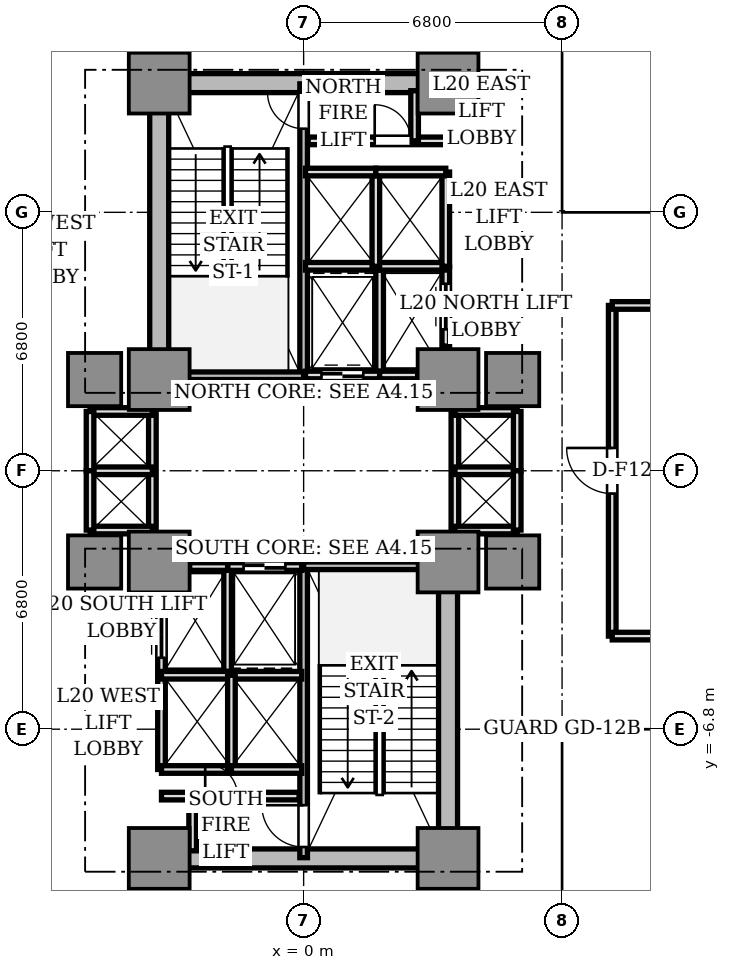
"""IFC4 building model, lengths in metres.
Left out: names, types, materials, properties, quantities, classifications, styles, units other than length and angle.
Written with IfcOpenShell. Run it as: python <this file> out.ifc"""

import sys

from ifc_helpers import new_model, si_unit, direction, frame, frame_2d, origin, origin_2d, place, context, subcontext, project, spatial, rectangle, extrude, source, transform, mapped, element, fill, save


model = new_model("IFC4")
c1 = context("Model", 3, precision=1e-05, world=origin(), true_north=direction((0.0, 1.0)))
c2 = subcontext(c1, "Body", "Model", "MODEL_VIEW")
j1 = project(units=[si_unit("LENGTHUNIT", "METRE"), si_unit("PLANEANGLEUNIT", "RADIAN")], contexts=[c1])
p1 = place(None, origin())
s1 = spatial("IfcSite", under=j1, at=p1, CompositionType="ELEMENT")
p2 = place(p1, origin())
s2 = spatial("IfcBuilding", under=s1, at=p2, CompositionType="ELEMENT")
p3 = place(p2, frame((0.0, 0.0, 74.5)))
s3 = spatial("IfcBuildingStorey", under=s2, at=p3, CompositionType="ELEMENT", Elevation=74.5)
p4 = place(p3, frame((-3.55, 10.2, 0.0), z_axis=(0.0, 0.0, 1.0), x_axis=(1.0, 0.0, 0.0)))
e1 = element("IfcWall", 1, at=p4, inside=s3, PredefinedType="SHEAR", context=c2, shape_type="SweptSolid", body=[
    extrude(rectangle(XDim=7.1, YDim=0.5, at=frame_2d((3.55, 0.0))), origin(), (0.0, 0.0, 1.0), 4.18),
])
p5 = place(p3, frame((-3.8, 2.85, 0.0), z_axis=(0.0, 0.0, 1.0), x_axis=(0.0, 1.0, 0.0)))
e2 = element("IfcWall", 2, at=p5, inside=s3, PredefinedType="SHEAR", context=c2, shape_type="SweptSolid", body=[
    extrude(rectangle(XDim=6.9, YDim=0.5, at=frame_2d((3.45, 0.0))), origin(), (0.0, 0.0, 1.0), 4.18),
])
p6 = place(p3, frame((-3.55, -10.2, 0.0), z_axis=(0.0, 0.0, 1.0), x_axis=(1.0, 0.0, 0.0)))
e3 = element("IfcWall", 3, at=p6, inside=s3, PredefinedType="SHEAR", context=c2, shape_type="SweptSolid", body=[
    extrude(rectangle(XDim=7.1, YDim=0.5, at=frame_2d((3.55, 0.0))), origin(), (0.0, 0.0, 1.0), 4.18),
])
p7 = place(p3, frame((3.8, -9.75, 0.0), z_axis=(0.0, 0.0, 1.0), x_axis=(0.0, 1.0, 0.0)))
e4 = element("IfcWall", 4, at=p7, inside=s3, PredefinedType="SHEAR", context=c2, shape_type="SweptSolid", body=[
    extrude(rectangle(XDim=6.9, YDim=0.5, at=frame_2d((3.45, 0.0))), origin(), (0.0, 0.0, 1.0), 4.18),
])
m1 = source(origin(), c2, "Body", "SweptSolid", [
    extrude(rectangle(XDim=1.6, YDim=1.6, at=origin_2d()), origin(), (0.0, 0.0, 1.0), 4.18),
])
for number, where, z_axis, x_axis in (
    (5, (-3.8, 2.4, 0.0), (0.0, 0.0, 1.0), (1.0, 0.0, 0.0)),
    (6, (3.8, 2.4, 0.0), (0.0, 0.0, 1.0), (1.0, 0.0, 0.0)),
    (7, (-3.8, 10.2, 0.0), (0.0, 0.0, 1.0), (1.0, 0.0, 0.0)),
    (8, (3.8, 10.2, 0.0), (0.0, 0.0, 1.0), (1.0, 0.0, 0.0)),
    (9, (-3.8, -2.4, 0.0), (0.0, 0.0, 1.0), (1.0, 0.0, 0.0)),
    (10, (3.8, -2.4, 0.0), (0.0, 0.0, 1.0), (1.0, 0.0, 0.0)),
    (11, (-3.8, -10.2, 0.0), (0.0, 0.0, 1.0), (1.0, 0.0, 0.0)),
    (12, (3.8, -10.2, 0.0), (0.0, 0.0, 1.0), (1.0, 0.0, 0.0)),
):
    element("IfcColumn", number, at=place(p3, frame(where, z_axis=z_axis, x_axis=x_axis)), inside=s3, PredefinedType="COLUMN", context=c2, shape_type="MappedRepresentation", body=[
        mapped(m1, transform((0.0, 0.0, 0.0), scale=1.0)),
    ])
m2 = source(origin(), c2, "Body", "SweptSolid", [
    extrude(rectangle(XDim=1.4, YDim=1.4, at=origin_2d()), origin(), (0.0, 0.0, 1.0), 4.18),
])
for number, where, z_axis, x_axis in (
    (13, (5.5, 2.4, 0.0), (0.0, 0.0, 1.0), (1.0, 0.0, 0.0)),
    (14, (-5.5, 2.4, 0.0), (0.0, 0.0, 1.0), (1.0, 0.0, 0.0)),
    (15, (5.5, -2.4, 0.0), (0.0, 0.0, 1.0), (1.0, 0.0, 0.0)),
    (16, (-5.5, -2.4, 0.0), (0.0, 0.0, 1.0), (1.0, 0.0, 0.0)),
):
    element("IfcColumn", number, at=place(p3, frame(where, z_axis=z_axis, x_axis=x_axis)), inside=s3, PredefinedType="COLUMN", context=c2, shape_type="MappedRepresentation", body=[
        mapped(m2, transform((0.0, 0.0, 0.0), scale=1.0)),
    ])
p8 = place(p3, frame((0.0, 2.5, 0.0), z_axis=(0.0, 0.0, 1.0), x_axis=(0.0, 1.0, 0.0)))
e17 = element("IfcWall", 17, at=p8, inside=s3, PredefinedType="SOLIDWALL", context=c2, shape_type="SweptSolid", body=[
    extrude(rectangle(XDim=7.68, YDim=0.2, at=frame_2d((3.84, 0.0))), origin(), (0.0, 0.0, 1.0), 4.18),
])
p9 = place(p8, frame((6.5, 0.0, 0.0)))
e18 = element("IfcOpeningElement", 18, at=p9, cuts=e17, PredefinedType="OPENING", context=c2, shape_type="SweptSolid", body=[
    extrude(rectangle(XDim=0.95, YDim=2.15, at=frame_2d((0.475, 1.075))), frame((0.0, 0.11, 0.0), z_axis=(0.0, -1.0, 0.0), x_axis=(1.0, 0.0, 0.0)), (0.0, 0.0, 1.0), 0.22),
])
p10 = place(p3, frame((-3.72, 2.5, 0.0), z_axis=(0.0, 0.0, 1.0), x_axis=(1.0, 0.0, 0.0)))
e19 = element("IfcWall", 19, at=p10, inside=s3, PredefinedType="SOLIDWALL", context=c2, shape_type="SweptSolid", body=[
    extrude(rectangle(XDim=3.72, YDim=0.2, at=frame_2d((1.86, 0.0))), origin(), (0.0, 0.0, 1.0), 4.18),
])
p11 = place(p3, frame((0.0, -10.18, 0.0), z_axis=(0.0, 0.0, 1.0), x_axis=(0.0, 1.0, 0.0)))
e20 = element("IfcWall", 20, at=p11, inside=s3, PredefinedType="SOLIDWALL", context=c2, shape_type="SweptSolid", body=[
    extrude(rectangle(XDim=7.68, YDim=0.2, at=frame_2d((3.84, 0.0))), origin(), (0.0, 0.0, 1.0), 4.18),
])
p12 = place(p11, frame((0.28, 0.0, 0.0)))
e21 = element("IfcOpeningElement", 21, at=p12, cuts=e20, PredefinedType="OPENING", context=c2, shape_type="SweptSolid", body=[
    extrude(rectangle(XDim=1.1, YDim=2.15, at=frame_2d((0.55, 1.075))), frame((0.0, 0.11, 0.0), z_axis=(0.0, -1.0, 0.0), x_axis=(1.0, 0.0, 0.0)), (0.0, 0.0, 1.0), 0.22),
])
p13 = place(p3, frame((0.0, -2.5, 0.0), z_axis=(0.0, 0.0, 1.0), x_axis=(1.0, 0.0, 0.0)))
e22 = element("IfcWall", 22, at=p13, inside=s3, PredefinedType="SOLIDWALL", context=c2, shape_type="SweptSolid", body=[
    extrude(rectangle(XDim=3.72, YDim=0.2, at=frame_2d((1.86, 0.0))), origin(), (0.0, 0.0, 1.0), 4.18),
])
p14 = place(p3, frame((2.0, 2.5, 0.0), z_axis=(0.0, 0.0, 1.0), x_axis=(0.0, 1.0, 0.0)))
e23 = element("IfcWall", 23, at=p14, inside=s3, PredefinedType="SOLIDWALL", context=c2, shape_type="SweptSolid", body=[
    extrude(rectangle(XDim=2.78, YDim=0.2, at=frame_2d((1.39, 0.0))), origin(), (0.0, 0.0, 1.0), 3.73),
])
p15 = place(p3, frame((0.05, 2.52, 0.0), z_axis=(0.0, 0.0, 1.0), x_axis=(1.0, 0.0, 0.0)))
e24 = element("IfcWall", 24, at=p15, inside=s3, PredefinedType="SOLIDWALL", context=c2, shape_type="SweptSolid", body=[
    extrude(rectangle(XDim=1.95, YDim=0.2, at=frame_2d((0.975, 0.0))), origin(), (0.0, 0.0, 1.0), 3.73),
])
p16 = place(p15, frame((0.42, 0.0, 0.0)))
e25 = element("IfcOpeningElement", 25, at=p16, cuts=e24, PredefinedType="OPENING", context=c2, shape_type="SweptSolid", body=[
    extrude(rectangle(XDim=1.1, YDim=2.2, at=frame_2d((0.55, 1.1))), frame((0.0, 0.11, 0.0), z_axis=(0.0, -1.0, 0.0), x_axis=(1.0, 0.0, 0.0)), (0.0, 0.0, 1.0), 0.22),
])
p17 = place(p3, frame((-2.0, -5.28, 0.0), z_axis=(0.0, 0.0, 1.0), x_axis=(0.0, 1.0, 0.0)))
e26 = element("IfcWall", 26, at=p17, inside=s3, PredefinedType="SOLIDWALL", context=c2, shape_type="SweptSolid", body=[
    extrude(rectangle(XDim=2.78, YDim=0.2, at=frame_2d((1.39, 0.0))), origin(), (0.0, 0.0, 1.0), 3.73),
])
p18 = place(p3, frame((-2.0, -2.52, 0.0), z_axis=(0.0, 0.0, 1.0), x_axis=(1.0, 0.0, 0.0)))
e27 = element("IfcWall", 27, at=p18, inside=s3, PredefinedType="SOLIDWALL", context=c2, shape_type="SweptSolid", body=[
    extrude(rectangle(XDim=1.95, YDim=0.2, at=frame_2d((0.975, 0.0))), origin(), (0.0, 0.0, 1.0), 3.73),
])
p19 = place(p18, frame((0.42, 0.0, 0.0)))
e28 = element("IfcOpeningElement", 28, at=p19, cuts=e27, PredefinedType="OPENING", context=c2, shape_type="SweptSolid", body=[
    extrude(rectangle(XDim=1.1, YDim=2.2, at=frame_2d((0.55, 1.1))), frame((0.0, 0.11, 0.0), z_axis=(0.0, -1.0, 0.0), x_axis=(1.0, 0.0, 0.0)), (0.0, 0.0, 1.0), 0.22),
])
p20 = place(p3, frame((2.0, 2.52, 0.0), z_axis=(0.0, 0.0, 1.0), x_axis=(1.0, 0.0, 0.0)))
e29 = element("IfcWall", 29, at=p20, inside=s3, PredefinedType="SOLIDWALL", context=c2, shape_type="SweptSolid", body=[
    extrude(rectangle(XDim=1.0, YDim=0.2, at=frame_2d((0.5, 0.0))), origin(), (0.0, 0.0, 1.0), 3.73),
])
p21 = place(p3, frame((3.74, 3.28, 0.0), z_axis=(0.0, 0.0, 1.0), x_axis=(0.0, 1.0, 0.0)))
e30 = element("IfcWall", 30, at=p21, inside=s3, PredefinedType="SOLIDWALL", context=c2, shape_type="SweptSolid", body=[
    extrude(rectangle(XDim=2.08, YDim=0.2, at=frame_2d((1.04, 0.0))), origin(), (0.0, 0.0, 1.0), 3.73),
])
p22 = place(p21, frame((0.44, 0.0, 0.0)))
e31 = element("IfcOpeningElement", 31, at=p22, cuts=e30, PredefinedType="OPENING", context=c2, shape_type="SweptSolid", body=[
    extrude(rectangle(XDim=1.2, YDim=2.2, at=frame_2d((0.6, 1.1))), frame((0.0, 0.11, 0.0), z_axis=(0.0, -1.0, 0.0), x_axis=(1.0, 0.0, 0.0)), (0.0, 0.0, 1.0), 0.22),
])
p23 = place(p3, frame((-3.0, -2.52, 0.0), z_axis=(0.0, 0.0, 1.0), x_axis=(1.0, 0.0, 0.0)))
e32 = element("IfcWall", 32, at=p23, inside=s3, PredefinedType="SOLIDWALL", context=c2, shape_type="SweptSolid", body=[
    extrude(rectangle(XDim=1.0, YDim=0.2, at=frame_2d((0.5, 0.0))), origin(), (0.0, 0.0, 1.0), 3.73),
])
p24 = place(p3, frame((-3.74, -5.36, 0.0), z_axis=(0.0, 0.0, 1.0), x_axis=(0.0, 1.0, 0.0)))
e33 = element("IfcWall", 33, at=p24, inside=s3, PredefinedType="SOLIDWALL", context=c2, shape_type="SweptSolid", body=[
    extrude(rectangle(XDim=2.08, YDim=0.2, at=frame_2d((1.04, 0.0))), origin(), (0.0, 0.0, 1.0), 3.73),
])
p25 = place(p24, frame((0.44, 0.0, 0.0)))
e34 = element("IfcOpeningElement", 34, at=p25, cuts=e33, PredefinedType="OPENING", context=c2, shape_type="SweptSolid", body=[
    extrude(rectangle(XDim=1.2, YDim=2.2, at=frame_2d((0.6, 1.1))), frame((0.0, 0.11, 0.0), z_axis=(0.0, -1.0, 0.0), x_axis=(1.0, 0.0, 0.0)), (0.0, 0.0, 1.0), 0.22),
])
p26 = place(p3, frame((0.05, 5.38, 0.0), z_axis=(0.0, 0.0, 1.0), x_axis=(1.0, 0.0, 0.0)))
e35 = element("IfcWall", 35, at=p26, inside=s3, PredefinedType="SOLIDWALL", context=c2, shape_type="SweptSolid", body=[
    extrude(rectangle(XDim=3.69, YDim=0.2, at=frame_2d((1.845, 0.0))), origin(), (0.0, 0.0, 1.0), 3.73),
])
p27 = place(p3, frame((1.9, 5.38, 0.0), z_axis=(0.0, 0.0, 1.0), x_axis=(0.0, 1.0, 0.0)))
e36 = element("IfcWall", 36, at=p27, inside=s3, PredefinedType="SOLIDWALL", context=c2, shape_type="SweptSolid", body=[
    extrude(rectangle(XDim=2.48, YDim=0.2, at=frame_2d((1.24, 0.0))), origin(), (0.0, 0.0, 1.0), 3.73),
])
p28 = place(p3, frame((0.05, 7.86, 0.0), z_axis=(0.0, 0.0, 1.0), x_axis=(1.0, 0.0, 0.0)))
e37 = element("IfcWall", 37, at=p28, inside=s3, PredefinedType="SOLIDWALL", context=c2, shape_type="SweptSolid", body=[
    extrude(rectangle(XDim=1.85, YDim=0.2, at=frame_2d((0.925, 0.0))), origin(), (0.0, 0.0, 1.0), 3.73),
])
p29 = place(p3, frame((3.74, 5.38, 0.0), z_axis=(0.0, 0.0, 1.0), x_axis=(0.0, 1.0, 0.0)))
e38 = element("IfcWall", 38, at=p29, inside=s3, PredefinedType="SOLIDWALL", context=c2, shape_type="SweptSolid", body=[
    extrude(rectangle(XDim=2.48, YDim=0.2, at=frame_2d((1.24, 0.0))), origin(), (0.0, 0.0, 1.0), 3.73),
])
p30 = place(p3, frame((1.9, 7.86, 0.0), z_axis=(0.0, 0.0, 1.0), x_axis=(1.0, 0.0, 0.0)))
e39 = element("IfcWall", 39, at=p30, inside=s3, PredefinedType="SOLIDWALL", context=c2, shape_type="SweptSolid", body=[
    extrude(rectangle(XDim=1.84, YDim=0.2, at=frame_2d((0.92, 0.0))), origin(), (0.0, 0.0, 1.0), 3.73),
])
p31 = place(p3, frame((-3.74, -7.86, 0.0), z_axis=(0.0, 0.0, 1.0), x_axis=(0.0, 1.0, 0.0)))
e40 = element("IfcWall", 40, at=p31, inside=s3, PredefinedType="SOLIDWALL", context=c2, shape_type="SweptSolid", body=[
    extrude(rectangle(XDim=2.48, YDim=0.2, at=frame_2d((1.24, 0.0))), origin(), (0.0, 0.0, 1.0), 3.73),
])
p32 = place(p3, frame((-3.74, -7.86, 0.0), z_axis=(0.0, 0.0, 1.0), x_axis=(1.0, 0.0, 0.0)))
e41 = element("IfcWall", 41, at=p32, inside=s3, PredefinedType="SOLIDWALL", context=c2, shape_type="SweptSolid", body=[
    extrude(rectangle(XDim=1.84, YDim=0.2, at=frame_2d((0.92, 0.0))), origin(), (0.0, 0.0, 1.0), 3.73),
])
p33 = place(p3, frame((-3.74, -5.38, 0.0), z_axis=(0.0, 0.0, 1.0), x_axis=(1.0, 0.0, 0.0)))
e42 = element("IfcWall", 42, at=p33, inside=s3, PredefinedType="SOLIDWALL", context=c2, shape_type="SweptSolid", body=[
    extrude(rectangle(XDim=3.69, YDim=0.2, at=frame_2d((1.845, 0.0))), origin(), (0.0, 0.0, 1.0), 3.73),
])
p34 = place(p3, frame((-1.9, -7.86, 0.0), z_axis=(0.0, 0.0, 1.0), x_axis=(0.0, 1.0, 0.0)))
e43 = element("IfcWall", 43, at=p34, inside=s3, PredefinedType="SOLIDWALL", context=c2, shape_type="SweptSolid", body=[
    extrude(rectangle(XDim=2.48, YDim=0.2, at=frame_2d((1.24, 0.0))), origin(), (0.0, 0.0, 1.0), 3.73),
])
p35 = place(p3, frame((-1.9, -7.86, 0.0), z_axis=(0.0, 0.0, 1.0), x_axis=(1.0, 0.0, 0.0)))
e44 = element("IfcWall", 44, at=p35, inside=s3, PredefinedType="SOLIDWALL", context=c2, shape_type="SweptSolid", body=[
    extrude(rectangle(XDim=1.85, YDim=0.2, at=frame_2d((0.925, 0.0))), origin(), (0.0, 0.0, 1.0), 3.73),
])
p36 = place(p3, frame((3.98, -1.56, 0.0), z_axis=(0.0, 0.0, 1.0), x_axis=(0.0, 1.0, 0.0)))
e45 = element("IfcWall", 45, at=p36, inside=s3, PredefinedType="SOLIDWALL", context=c2, shape_type="SweptSolid", body=[
    extrude(rectangle(XDim=3.12, YDim=0.2, at=frame_2d((1.56, 0.0))), origin(), (0.0, 0.0, 1.0), 3.25),
])
for number, where, z_axis, x_axis in (
    (46, (3.98, 1.56, 0.0), (0.0, 0.0, 1.0), (1.0, 0.0, 0.0)),
    (47, (3.98, -1.56, 0.0), (0.0, 0.0, 1.0), (1.0, 0.0, 0.0)),
    (48, (3.98, 0.0, 0.0), (0.0, 0.0, 1.0), (1.0, 0.0, 0.0)),
):
    element("IfcWall", number, at=place(p3, frame(where, z_axis=z_axis, x_axis=x_axis)), inside=s3, PredefinedType="SOLIDWALL", context=c2, shape_type="SweptSolid", body=[
        extrude(rectangle(XDim=1.64, YDim=0.2, at=frame_2d((0.82, 0.0))), origin(), (0.0, 0.0, 1.0), 3.73),
    ])
for number, where, z_axis, x_axis in (
    (49, (5.62, 0.0, 0.0), (0.0, 0.0, 1.0), (0.0, 1.0, 0.0)),
    (50, (5.62, -1.56, 0.0), (0.0, 0.0, 1.0), (0.0, 1.0, 0.0)),
):
    element("IfcWall", number, at=place(p3, frame(where, z_axis=z_axis, x_axis=x_axis)), inside=s3, PredefinedType="SOLIDWALL", context=c2, shape_type="SweptSolid", body=[
        extrude(rectangle(XDim=1.56, YDim=0.2, at=frame_2d((0.78, 0.0))), origin(), (0.0, 0.0, 1.0), 3.73),
    ])
p37 = place(p3, frame((-3.98, -1.56, 0.0), z_axis=(0.0, 0.0, 1.0), x_axis=(0.0, 1.0, 0.0)))
e51 = element("IfcWall", 51, at=p37, inside=s3, PredefinedType="SOLIDWALL", context=c2, shape_type="SweptSolid", body=[
    extrude(rectangle(XDim=3.12, YDim=0.2, at=frame_2d((1.56, 0.0))), origin(), (0.0, 0.0, 1.0), 3.25),
])
for number, where, z_axis, x_axis in (
    (52, (-5.62, 1.56, 0.0), (0.0, 0.0, 1.0), (1.0, 0.0, 0.0)),
    (53, (-5.62, -1.56, 0.0), (0.0, 0.0, 1.0), (1.0, 0.0, 0.0)),
    (54, (-5.62, 0.0, 0.0), (0.0, 0.0, 1.0), (1.0, 0.0, 0.0)),
):
    element("IfcWall", number, at=place(p3, frame(where, z_axis=z_axis, x_axis=x_axis)), inside=s3, PredefinedType="SOLIDWALL", context=c2, shape_type="SweptSolid", body=[
        extrude(rectangle(XDim=1.64, YDim=0.2, at=frame_2d((0.82, 0.0))), origin(), (0.0, 0.0, 1.0), 3.73),
    ])
for number, where, z_axis, x_axis in (
    (55, (-5.62, 0.0, 0.0), (0.0, 0.0, 1.0), (0.0, 1.0, 0.0)),
    (56, (-5.62, -1.56, 0.0), (0.0, 0.0, 1.0), (0.0, 1.0, 0.0)),
):
    element("IfcWall", number, at=place(p3, frame(where, z_axis=z_axis, x_axis=x_axis)), inside=s3, PredefinedType="SOLIDWALL", context=c2, shape_type="SweptSolid", body=[
        extrude(rectangle(XDim=1.56, YDim=0.2, at=frame_2d((0.78, 0.0))), origin(), (0.0, 0.0, 1.0), 3.73),
    ])
p38 = place(p3, frame((0.12, 8.68, 0.0), z_axis=(0.0, 0.0, 1.0), x_axis=(1.0, 0.0, 0.0)))
e57 = element("IfcWall", 57, at=p38, inside=s3, PredefinedType="SOLIDWALL", context=c2, shape_type="SweptSolid", body=[
    extrude(rectangle(XDim=3.62, YDim=0.2, at=frame_2d((1.81, 0.0))), origin(), (0.0, 0.0, 1.0), 3.73),
])
p39 = place(p38, frame((1.75, 0.0, 0.0)))
e58 = element("IfcOpeningElement", 58, at=p39, cuts=e57, PredefinedType="OPENING", context=c2, shape_type="SweptSolid", body=[
    extrude(rectangle(XDim=0.95, YDim=2.15, at=frame_2d((0.475, 1.075))), frame((0.0, 0.11, 0.0), z_axis=(0.0, -1.0, 0.0), x_axis=(1.0, 0.0, 0.0)), (0.0, 0.0, 1.0), 0.22),
])
p40 = place(p3, frame((2.92, 8.68, 0.0), z_axis=(0.0, 0.0, 1.0), x_axis=(0.0, 1.0, 0.0)))
e59 = element("IfcWall", 59, at=p40, inside=s3, PredefinedType="SOLIDWALL", context=c2, shape_type="SweptSolid", body=[
    extrude(rectangle(XDim=1.32, YDim=0.2, at=frame_2d((0.66, 0.0))), origin(), (0.0, 0.0, 1.0), 3.73),
])
p41 = place(p3, frame((-3.74, -8.56, 0.0), z_axis=(0.0, 0.0, 1.0), x_axis=(1.0, 0.0, 0.0)))
e60 = element("IfcWall", 60, at=p41, inside=s3, PredefinedType="SOLIDWALL", context=c2, shape_type="SweptSolid", body=[
    extrude(rectangle(XDim=3.62, YDim=0.2, at=frame_2d((1.81, 0.0))), origin(), (0.0, 0.0, 1.0), 3.73),
])
p42 = place(p41, frame((1.15, 0.0, 0.0)))
e61 = element("IfcOpeningElement", 61, at=p42, cuts=e60, PredefinedType="OPENING", context=c2, shape_type="SweptSolid", body=[
    extrude(rectangle(XDim=0.85, YDim=2.1, at=frame_2d((0.425, 1.05))), frame((0.0, 0.11, 0.0), z_axis=(0.0, -1.0, 0.0), x_axis=(1.0, 0.0, 0.0)), (0.0, 0.0, 1.0), 0.22),
])
p43 = place(p3, frame((-2.92, -10.0, 0.0), z_axis=(0.0, 0.0, 1.0), x_axis=(0.0, 1.0, 0.0)))
e62 = element("IfcWall", 62, at=p43, inside=s3, PredefinedType="SOLIDWALL", context=c2, shape_type="SweptSolid", body=[
    extrude(rectangle(XDim=1.44, YDim=0.2, at=frame_2d((0.72, 0.0))), origin(), (0.0, 0.0, 1.0), 3.73),
])
p44 = place(p3, frame((8.12, -4.35, 0.0), z_axis=(0.0, 0.0, 1.0), x_axis=(0.0, 1.0, 0.0)))
e63 = element("IfcWall", 63, at=p44, inside=s3, PredefinedType="SOLIDWALL", context=c2, shape_type="SweptSolid", body=[
    extrude(rectangle(XDim=8.7, YDim=0.2, at=frame_2d((4.35, 0.0))), origin(), (0.0, 0.0, 1.0), 3.73),
])
p45 = place(p44, frame((3.75, 0.0, 0.0)))
e64 = element("IfcOpeningElement", 64, at=p45, cuts=e63, PredefinedType="OPENING", context=c2, shape_type="SweptSolid", body=[
    extrude(rectangle(XDim=1.2, YDim=2.2, at=frame_2d((0.6, 1.1))), frame((0.0, 0.11, 0.0), z_axis=(0.0, -1.0, 0.0), x_axis=(1.0, 0.0, 0.0)), (0.0, 0.0, 1.0), 0.22),
])
for number, where, z_axis, x_axis in (
    (65, (8.12, 4.35, 0.0), (0.0, 0.0, 1.0), (1.0, 0.0, 0.0)),
    (66, (8.12, -4.35, 0.0), (0.0, 0.0, 1.0), (1.0, 0.0, 0.0)),
):
    element("IfcWall", number, at=place(p3, frame(where, z_axis=z_axis, x_axis=x_axis)), inside=s3, PredefinedType="SOLIDWALL", context=c2, shape_type="SweptSolid", body=[
        extrude(rectangle(XDim=13.38, YDim=0.2, at=frame_2d((6.69, 0.0))), origin(), (0.0, 0.0, 1.0), 2.65),
    ])
m3 = source(origin(), c2, "Body", "SweptSolid", [
    extrude(rectangle(XDim=1.1, YDim=0.05, at=origin_2d()), origin(), (0.0, 0.0, 1.0), 2.2),
])
p46 = place(p16, frame((0.55, 0.0, 0.0)))
e67 = element("IfcDoor", 67, at=p46, inside=s3, OperationType="DOUBLE_DOOR_SLIDING", PredefinedType="DOOR", context=c2, shape_type="MappedRepresentation", body=[
    mapped(m3, transform((0.0, 0.0, 0.0), scale=1.0)),
])
fill(e25, e67)
p47 = place(p19, frame((0.55, 0.0, 0.0)))
e68 = element("IfcDoor", 68, at=p47, inside=s3, OperationType="DOUBLE_DOOR_SLIDING", PredefinedType="DOOR", context=c2, shape_type="MappedRepresentation", body=[
    mapped(m3, transform((0.0, 0.0, 0.0), scale=1.0)),
])
fill(e28, e68)
m4 = source(origin(), c2, "Body", "SweptSolid", [
    extrude(rectangle(XDim=1.2, YDim=0.05, at=origin_2d()), origin(), (0.0, 0.0, 1.0), 2.2),
])
p48 = place(p22, frame((0.6, 0.0, 0.0)))
e69 = element("IfcDoor", 69, at=p48, inside=s3, OperationType="DOUBLE_DOOR_SLIDING", PredefinedType="DOOR", context=c2, shape_type="MappedRepresentation", body=[
    mapped(m4, transform((0.0, 0.0, 0.0), scale=1.0)),
])
fill(e31, e69)
p49 = place(p25, frame((0.6, 0.0, 0.0)))
e70 = element("IfcDoor", 70, at=p49, inside=s3, OperationType="DOUBLE_DOOR_SLIDING", PredefinedType="DOOR", context=c2, shape_type="MappedRepresentation", body=[
    mapped(m4, transform((0.0, 0.0, 0.0), scale=1.0)),
])
fill(e34, e70)
m5 = source(origin(), c2, "Body", "SweptSolid", [
    extrude(rectangle(XDim=0.95, YDim=0.05, at=origin_2d()), origin(), (0.0, 0.0, 1.0), 2.15),
])
p50 = place(p9, frame((0.475, 0.0, 0.0)))
e71 = element("IfcDoor", 71, at=p50, inside=s3, OperationType="SINGLE_SWING_RIGHT", PredefinedType="DOOR", context=c2, shape_type="MappedRepresentation", body=[
    mapped(m5, transform((0.0, 0.0, 0.0), scale=1.0)),
])
fill(e18, e71)
p51 = place(p39, frame((0.475, 0.0, 0.0)))
e72 = element("IfcDoor", 72, at=p51, inside=s3, OperationType="SINGLE_SWING_LEFT", PredefinedType="DOOR", context=c2, shape_type="MappedRepresentation", body=[
    mapped(m5, transform((0.0, 0.0, 0.0), scale=1.0)),
])
fill(e58, e72)
m6 = source(origin(), c2, "Body", "SweptSolid", [
    extrude(rectangle(XDim=1.1, YDim=0.05, at=origin_2d()), origin(), (0.0, 0.0, 1.0), 2.15),
])
p52 = place(p12, frame((0.55, 0.0, 0.0)))
e73 = element("IfcDoor", 73, at=p52, inside=s3, OperationType="SINGLE_SWING_RIGHT", PredefinedType="DOOR", context=c2, shape_type="MappedRepresentation", body=[
    mapped(m6, transform((0.0, 0.0, 0.0), scale=1.0)),
])
fill(e21, e73)
m7 = source(origin(), c2, "Body", "SweptSolid", [
    extrude(rectangle(XDim=0.85, YDim=0.05, at=origin_2d()), origin(), (0.0, 0.0, 1.0), 2.1),
])
p53 = place(p42, frame((0.425, 0.0, 0.0)))
e74 = element("IfcDoor", 74, at=p53, inside=s3, OperationType="SINGLE_SWING_LEFT", PredefinedType="DOOR", context=c2, shape_type="MappedRepresentation", body=[
    mapped(m7, transform((0.0, 0.0, 0.0), scale=1.0)),
])
fill(e61, e74)
p54 = place(p45, frame((0.6, 0.0, 0.0)))
e75 = element("IfcDoor", 75, at=p54, inside=s3, OperationType="SINGLE_SWING_RIGHT", PredefinedType="DOOR", context=c2, shape_type="MappedRepresentation", body=[
    mapped(m4, transform((0.0, 0.0, 0.0), scale=1.0)),
])
fill(e64, e75)
save(model, sys.argv[1])
